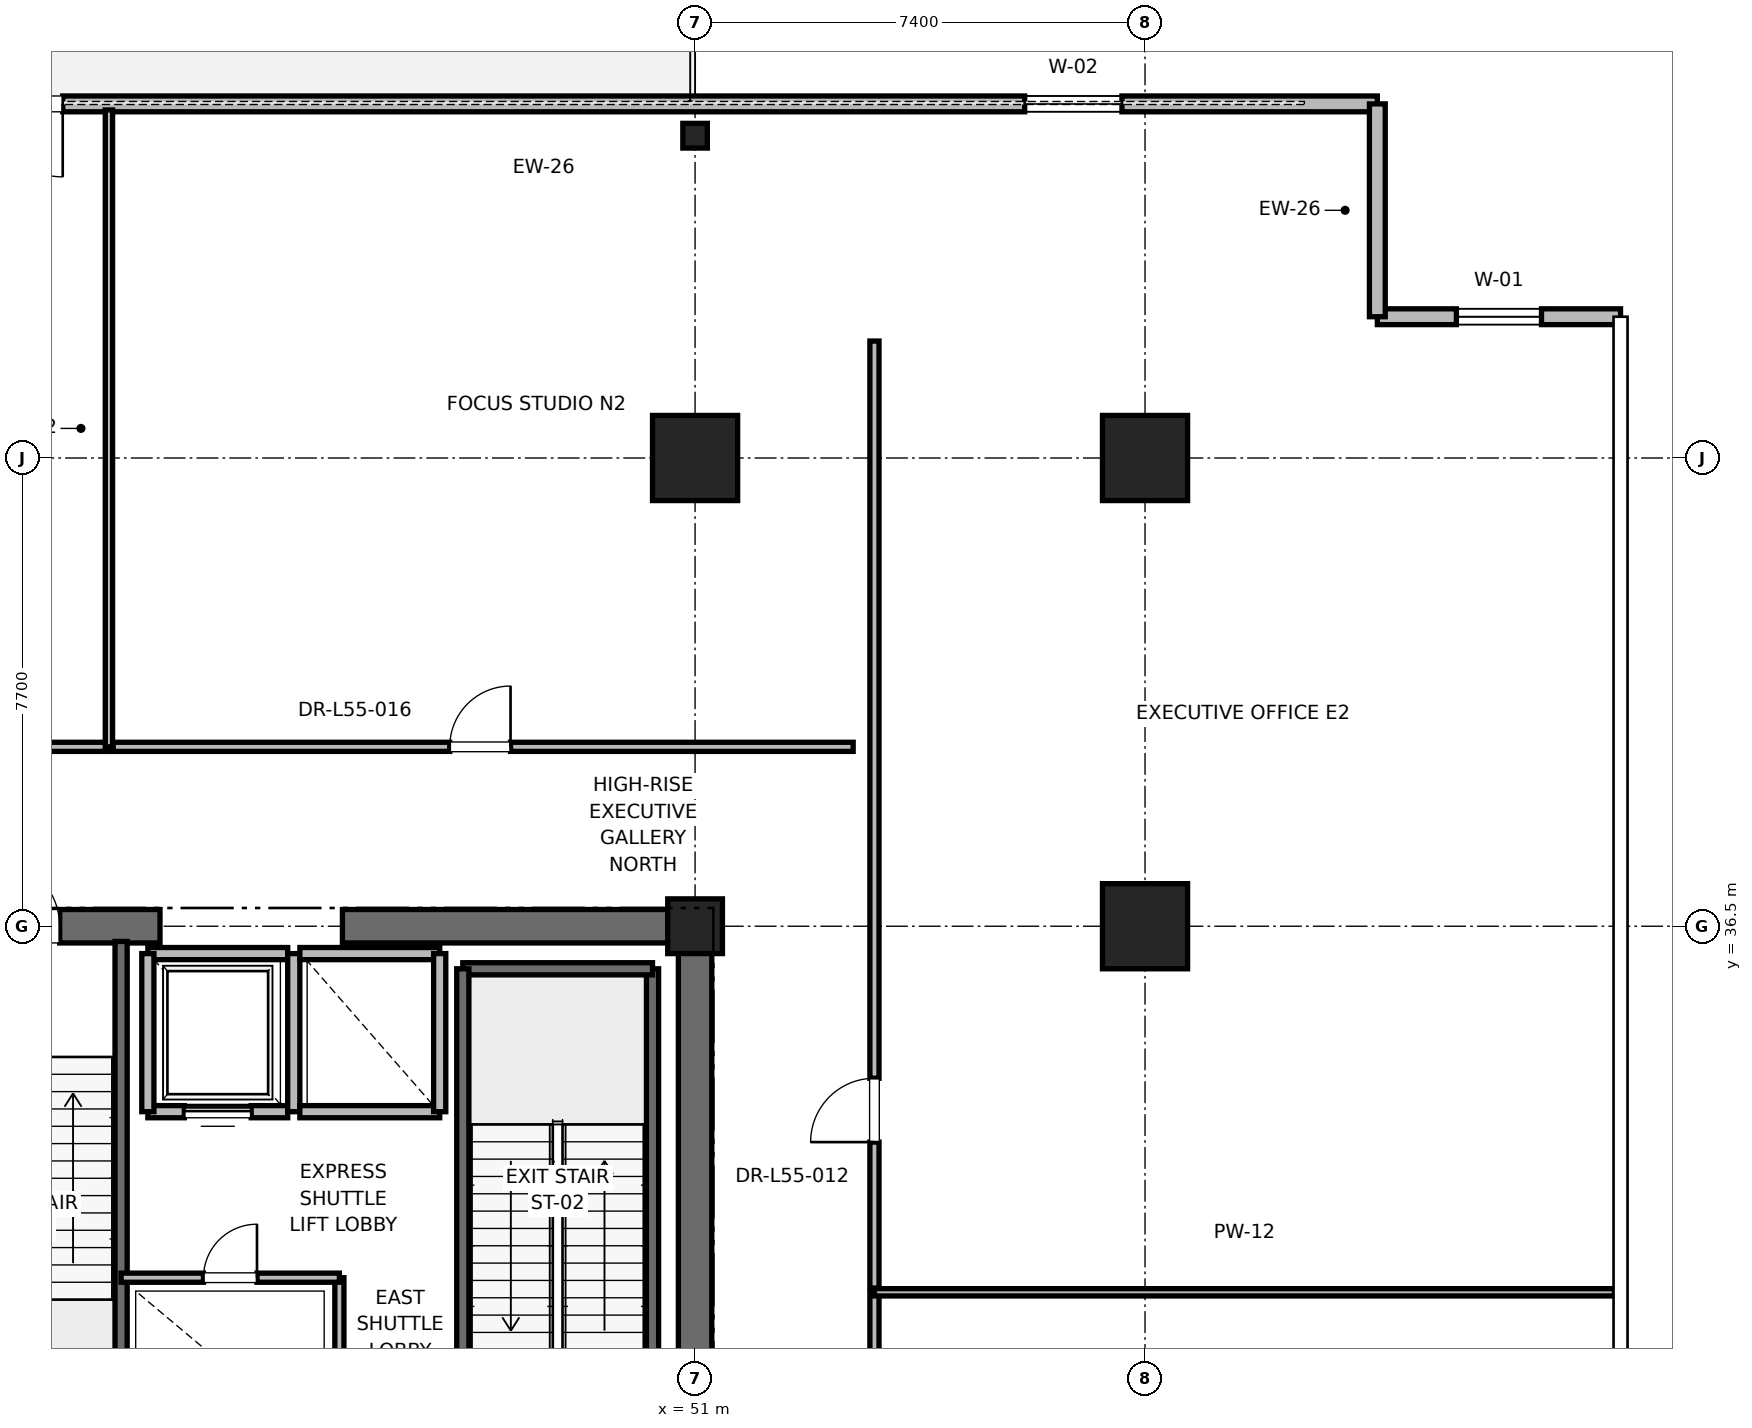
"""IFC4 building model, lengths in metres.
Left out: names, types, materials, properties, quantities, classifications, styles, units other than length and angle.
Written with IfcOpenShell. Run it as: python <this file> out.ifc"""

import sys

from ifc_helpers import new_model, si_unit, direction, frame, frame_2d, origin, origin_2d, place, context, subcontext, project, spatial, rectangle, i_section, extrude, element, fill, save


model = new_model("IFC4")
c1 = context("Model", 3, precision=1e-05, world=origin(), true_north=direction((0.0, 1.0)))
c2 = subcontext(c1, "Body", "Model", "MODEL_VIEW")
j1 = project(units=[si_unit("LENGTHUNIT", "METRE"), si_unit("PLANEANGLEUNIT", "RADIAN")], contexts=[c1])
p1 = place(None, origin())
s1 = spatial("IfcSite", under=j1, at=p1, CompositionType="ELEMENT")
p2 = place(p1, origin())
s2 = spatial("IfcBuilding", under=s1, at=p2, CompositionType="ELEMENT")
p3 = place(p2, frame((0.0, 0.0, 238.2)))
s3 = spatial("IfcBuildingStorey", under=s2, at=p3, CompositionType="ELEMENT", Elevation=238.2)
for number, where, z_axis, x_axis in (
    (1, (51.0, 44.2, 0.0), (0.0, 0.0, 1.0), (1.0, 0.0, 0.0)),
    (2, (58.4, 36.5, 0.0), (0.0, 0.0, 1.0), (1.0, 0.0, 0.0)),
    (3, (58.4, 44.2, 0.0), (0.0, 0.0, 1.0), (1.0, 0.0, 0.0)),
):
    element("IfcColumn", number, at=place(p3, frame(where, z_axis=z_axis, x_axis=x_axis)), inside=s3, PredefinedType="COLUMN", context=c2, shape_type="SweptSolid", body=[
        extrude(rectangle(XDim=1.4, YDim=1.4, at=origin_2d()), origin(), (0.0, 0.0, 1.0), 5.0),
    ])
p4 = place(p3, frame((51.0, 49.5, 0.0), z_axis=(0.0, 0.0, 1.0), x_axis=(1.0, 0.0, 0.0)))
e4 = element("IfcColumn", 4, at=p4, inside=s3, PredefinedType="COLUMN", context=c2, shape_type="SweptSolid", body=[
    extrude(i_section(OverallWidth=0.403, OverallDepth=0.406, WebThickness=0.027, FlangeThickness=0.043, FilletRadius=0.015, at=origin_2d()), origin(), (0.0, 0.0, 1.0), 5.0),
])
p5 = place(p3, frame((51.0, 36.5, 0.0), z_axis=(0.0, 0.0, 1.0), x_axis=(1.0, 0.0, 0.0)))
e5 = element("IfcColumn", 5, at=p5, inside=s3, PredefinedType="PILASTER", context=c2, shape_type="SweptSolid", body=[
    extrude(rectangle(XDim=0.9, YDim=0.9, at=origin_2d()), origin(), (0.0, 0.0, 1.0), 5.0),
])
p6 = place(p3, frame((37.8, 36.5, 0.0), z_axis=(0.0, 0.0, 1.0), x_axis=(1.0, 0.0, 0.0)))
e6 = element("IfcWall", 6, at=p6, inside=s3, PredefinedType="SHEAR", context=c2, shape_type="SweptSolid", body=[
    extrude(rectangle(XDim=4.4, YDim=0.55, at=frame_2d((2.2, 0.0))), origin(), (0.0, 0.0, 1.0), 4.785),
])
p7 = place(p6, frame((1.65, 0.0, 0.0)))
e7 = element("IfcOpeningElement", 7, at=p7, cuts=e6, PredefinedType="OPENING", context=c2, shape_type="SweptSolid", body=[
    extrude(rectangle(XDim=1.1, YDim=2.15, at=frame_2d((0.55, 1.075))), frame((0.0, 0.275, 0.0), z_axis=(0.0, -1.0, 0.0), x_axis=(1.0, 0.0, 0.0)), (0.0, 0.0, 1.0), 0.55),
])
p8 = place(p3, frame((45.2, 36.5, 0.0), z_axis=(0.0, 0.0, 1.0), x_axis=(1.0, 0.0, 0.0)))
e8 = element("IfcWall", 8, at=p8, inside=s3, PredefinedType="SHEAR", context=c2, shape_type="SweptSolid", body=[
    extrude(rectangle(XDim=5.8, YDim=0.55, at=frame_2d((2.9, 0.0))), origin(), (0.0, 0.0, 1.0), 4.785),
])
p9 = place(p3, frame((51.0, 27.7, 0.0), z_axis=(0.0, 0.0, 1.0), x_axis=(0.0, 1.0, 0.0)))
e9 = element("IfcWall", 9, at=p9, inside=s3, PredefinedType="SHEAR", context=c2, shape_type="SweptSolid", body=[
    extrude(rectangle(XDim=8.8, YDim=0.55, at=frame_2d((4.4, 0.0))), origin(), (0.0, 0.0, 1.0), 4.785),
])
p10 = place(p3, frame((62.221, 50.023, 0.0), z_axis=(0.0, 0.0, 1.0), x_axis=(-1.0, 0.0, 0.0)))
e10 = element("IfcWall", 10, at=p10, inside=s3, PredefinedType="PARAPET", context=c2, shape_type="SweptSolid", body=[
    extrude(rectangle(XDim=44.441, YDim=0.26, at=frame_2d((22.221, 0.0))), origin(), (0.0, 0.0, 1.0), 4.047),
])
p11 = place(p10, frame((4.2, 0.0, 0.85)))
e11 = element("IfcOpeningElement", 11, at=p11, cuts=e10, PredefinedType="OPENING", context=c2, shape_type="SweptSolid", body=[
    extrude(rectangle(XDim=1.6, YDim=2.1, at=frame_2d((0.8, 1.05))), frame((0.0, 0.13, 0.0), z_axis=(0.0, -1.0, 0.0), x_axis=(1.0, 0.0, 0.0)), (0.0, 0.0, 1.0), 0.26),
])
p12 = place(p10, frame((21.621, 0.0, 0.0)))
e12 = element("IfcOpeningElement", 12, at=p12, cuts=e10, PredefinedType="OPENING", context=c2, shape_type="SweptSolid", body=[
    extrude(rectangle(XDim=1.2, YDim=2.2, at=frame_2d((0.6, 1.1))), frame((0.0, 0.13, 0.0), z_axis=(0.0, -1.0, 0.0), x_axis=(1.0, 0.0, 0.0)), (0.0, 0.0, 1.0), 0.26),
])
p13 = place(p10, frame((38.641, 0.0, 0.85)))
e13 = element("IfcOpeningElement", 13, at=p13, cuts=e10, PredefinedType="OPENING", context=c2, shape_type="SweptSolid", body=[
    extrude(rectangle(XDim=1.6, YDim=2.1, at=frame_2d((0.8, 1.05))), frame((0.0, 0.13, 0.0), z_axis=(0.0, -1.0, 0.0), x_axis=(1.0, 0.0, 0.0)), (0.0, 0.0, 1.0), 0.26),
])
p14 = place(p3, frame((66.221, 46.523, 0.0), z_axis=(0.0, 0.0, 1.0), x_axis=(-1.0, 0.0, 0.0)))
e14 = element("IfcWall", 14, at=p14, inside=s3, PredefinedType="PARAPET", context=c2, shape_type="SweptSolid", body=[
    extrude(rectangle(XDim=4.0, YDim=0.26, at=frame_2d((2.0, 0.0))), origin(), (0.0, 0.0, 1.0), 4.785),
])
p15 = place(p14, frame((1.3, 0.0, 0.85)))
e15 = element("IfcOpeningElement", 15, at=p15, cuts=e14, PredefinedType="OPENING", context=c2, shape_type="SweptSolid", body=[
    extrude(rectangle(XDim=1.4, YDim=2.0, at=frame_2d((0.7, 1.0))), frame((0.0, 0.13, 0.0), z_axis=(0.0, -1.0, 0.0), x_axis=(1.0, 0.0, 0.0)), (0.0, 0.0, 1.0), 0.26),
])
p16 = place(p3, frame((62.221, 46.523, 0.0), z_axis=(0.0, 0.0, 1.0), x_axis=(0.0, 1.0, 0.0)))
e16 = element("IfcWall", 16, at=p16, inside=s3, PredefinedType="PARAPET", context=c2, shape_type="SweptSolid", body=[
    extrude(rectangle(XDim=3.5, YDim=0.26, at=frame_2d((1.75, 0.0))), origin(), (0.0, 0.0, 1.0), 4.785),
])
p17 = place(p3, frame((50.3, 27.65, 0.0), z_axis=(0.0, 0.0, 1.0), x_axis=(0.0, 1.0, 0.0)))
e17 = element("IfcWall", 17, at=p17, inside=s3, PredefinedType="SOLIDWALL", context=c2, shape_type="SweptSolid", body=[
    extrude(rectangle(XDim=8.15, YDim=0.2, at=frame_2d((4.075, 0.0))), origin(), (0.0, 0.0, 1.0), 4.785),
])
p18 = place(p3, frame((47.18, 35.8, 0.0), z_axis=(0.0, 0.0, 1.0), x_axis=(1.0, 0.0, 0.0)))
e18 = element("IfcWall", 18, at=p18, inside=s3, PredefinedType="SOLIDWALL", context=c2, shape_type="SweptSolid", body=[
    extrude(rectangle(XDim=3.12, YDim=0.2, at=frame_2d((1.56, 0.0))), origin(), (0.0, 0.0, 1.0), 4.785),
])
p19 = place(p3, frame((47.18, 27.62, 0.0), z_axis=(0.0, 0.0, 1.0), x_axis=(0.0, 1.0, 0.0)))
e19 = element("IfcWall", 19, at=p19, inside=s3, PredefinedType="SOLIDWALL", context=c2, shape_type="SweptSolid", body=[
    extrude(rectangle(XDim=8.18, YDim=0.2, at=frame_2d((4.09, 0.0))), origin(), (0.0, 0.0, 1.0), 4.785),
])
p20 = place(p3, frame((41.56, 27.68, 0.0), z_axis=(0.0, 0.0, 1.0), x_axis=(0.0, 1.0, 0.0)))
e20 = element("IfcWall", 20, at=p20, inside=s3, PredefinedType="SOLIDWALL", context=c2, shape_type="SweptSolid", body=[
    extrude(rectangle(XDim=8.57, YDim=0.2, at=frame_2d((4.285, 0.0))), origin(), (0.0, 0.0, 1.0), 4.785),
])
p21 = place(p3, frame((42.0, 33.45, 0.0), z_axis=(0.0, 0.0, 1.0), x_axis=(1.0, 0.0, 0.0)))
e21 = element("IfcWall", 21, at=p21, inside=s3, PredefinedType="SOLIDWALL", context=c2, shape_type="SweptSolid", body=[
    extrude(rectangle(XDim=2.3, YDim=0.2, at=frame_2d((1.15, 0.0))), origin(), (0.0, 0.0, 1.0), 4.785),
])
p22 = place(p21, frame((0.6, 0.0, 0.0)))
e22 = element("IfcOpeningElement", 22, at=p22, cuts=e21, PredefinedType="OPENING", context=c2, shape_type="SweptSolid", body=[
    extrude(rectangle(XDim=1.1, YDim=2.2, at=frame_2d((0.55, 1.1))), frame((0.0, 0.1, 0.0), z_axis=(0.0, -1.0, 0.0), x_axis=(1.0, 0.0, 0.0)), (0.0, 0.0, 1.0), 0.2),
])
p23 = place(p3, frame((44.3, 36.05, 0.0), z_axis=(0.0, 0.0, 1.0), x_axis=(-1.0, 0.0, 0.0)))
e23 = element("IfcWall", 23, at=p23, inside=s3, PredefinedType="SOLIDWALL", context=c2, shape_type="SweptSolid", body=[
    extrude(rectangle(XDim=2.3, YDim=0.2, at=frame_2d((1.15, 0.0))), origin(), (0.0, 0.0, 1.0), 3.765),
])
for number, where, z_axis, x_axis in (
    (24, (42.0, 36.05, 0.0), (0.0, 0.0, 1.0), (0.0, -1.0, 0.0)),
    (25, (44.4, 33.45, 0.0), (0.0, 0.0, 1.0), (0.0, 1.0, 0.0)),
):
    element("IfcWall", number, at=place(p3, frame(where, z_axis=z_axis, x_axis=x_axis)), inside=s3, PredefinedType="SOLIDWALL", context=c2, shape_type="SweptSolid", body=[
        extrude(rectangle(XDim=2.6, YDim=0.2, at=frame_2d((1.3, 0.0))), origin(), (0.0, 0.0, 1.0), 3.765),
    ])
p24 = place(p3, frame((44.5, 33.45, 0.0), z_axis=(0.0, 0.0, 1.0), x_axis=(1.0, 0.0, 0.0)))
e26 = element("IfcWall", 26, at=p24, inside=s3, PredefinedType="SOLIDWALL", context=c2, shape_type="SweptSolid", body=[
    extrude(rectangle(XDim=2.3, YDim=0.2, at=frame_2d((1.15, 0.0))), origin(), (0.0, 0.0, 1.0), 4.785),
])
p25 = place(p3, frame((46.8, 36.05, 0.0), z_axis=(0.0, 0.0, 1.0), x_axis=(-1.0, 0.0, 0.0)))
e27 = element("IfcWall", 27, at=p25, inside=s3, PredefinedType="SOLIDWALL", context=c2, shape_type="SweptSolid", body=[
    extrude(rectangle(XDim=2.3, YDim=0.2, at=frame_2d((1.15, 0.0))), origin(), (0.0, 0.0, 1.0), 3.765),
])
p26 = place(p3, frame((46.8, 33.45, 0.0), z_axis=(0.0, 0.0, 1.0), x_axis=(0.0, 1.0, 0.0)))
e28 = element("IfcWall", 28, at=p26, inside=s3, PredefinedType="SOLIDWALL", context=c2, shape_type="SweptSolid", body=[
    extrude(rectangle(XDim=2.6, YDim=0.2, at=frame_2d((1.3, 0.0))), origin(), (0.0, 0.0, 1.0), 4.785),
])
p27 = place(p3, frame((45.15, 27.62, 0.0), z_axis=(0.0, 0.0, 1.0), x_axis=(0.0, 1.0, 0.0)))
e29 = element("IfcWall", 29, at=p27, inside=s3, PredefinedType="PARTITIONING", context=c2, shape_type="SweptSolid", body=[
    extrude(rectangle(XDim=3.1, YDim=0.15, at=frame_2d((1.55, 0.0))), origin(), (0.0, 0.0, 1.0), 2.85),
])
p28 = place(p3, frame((41.56, 30.72, 0.0), z_axis=(0.0, 0.0, 1.0), x_axis=(1.0, 0.0, 0.0)))
e30 = element("IfcWall", 30, at=p28, inside=s3, PredefinedType="PARTITIONING", context=c2, shape_type="SweptSolid", body=[
    extrude(rectangle(XDim=3.59, YDim=0.15, at=frame_2d((1.795, 0.0))), origin(), (0.0, 0.0, 1.0), 2.85),
])
p29 = place(p28, frame((1.355, 0.0, 0.0)))
e31 = element("IfcOpeningElement", 31, at=p29, cuts=e30, PredefinedType="OPENING", context=c2, shape_type="SweptSolid", body=[
    extrude(rectangle(XDim=0.88, YDim=2.1, at=frame_2d((0.44, 1.05))), frame((0.0, 0.075, 0.0), z_axis=(0.0, -1.0, 0.0), x_axis=(1.0, 0.0, 0.0)), (0.0, 0.0, 1.0), 0.15),
])
p30 = place(p3, frame((26.4, 39.45, 0.0), z_axis=(0.0, 0.0, 1.0), x_axis=(1.0, 0.0, 0.0)))
e32 = element("IfcWall", 32, at=p30, inside=s3, PredefinedType="PARTITIONING", context=c2, shape_type="SweptSolid", body=[
    extrude(rectangle(XDim=14.96, YDim=0.15, at=frame_2d((7.48, 0.0))), origin(), (0.0, 0.0, 1.0), 2.85),
])
p31 = place(p30, frame((6.745, 0.0, 0.0)))
e33 = element("IfcOpeningElement", 33, at=p31, cuts=e32, PredefinedType="OPENING", context=c2, shape_type="SweptSolid", body=[
    extrude(rectangle(XDim=1.5, YDim=2.25, at=frame_2d((0.75, 1.125))), frame((0.0, 0.075, 0.0), z_axis=(0.0, -1.0, 0.0), x_axis=(1.0, 0.0, 0.0)), (0.0, 0.0, 1.0), 0.15),
])
p32 = place(p3, frame((41.36, 39.45, 0.0), z_axis=(0.0, 0.0, 1.0), x_axis=(0.0, 1.0, 0.0)))
e34 = element("IfcWall", 34, at=p32, inside=s3, PredefinedType="PARTITIONING", context=c2, shape_type="SweptSolid", body=[
    extrude(rectangle(XDim=10.473, YDim=0.12, at=frame_2d((5.237, 0.0))), origin(), (0.0, 0.0, 1.0), 2.85),
])
p33 = place(p3, frame((41.43, 39.45, 0.0), z_axis=(0.0, 0.0, 1.0), x_axis=(1.0, 0.0, 0.0)))
e35 = element("IfcWall", 35, at=p33, inside=s3, PredefinedType="PARTITIONING", context=c2, shape_type="SweptSolid", body=[
    extrude(rectangle(XDim=12.17, YDim=0.15, at=frame_2d((6.085, 0.0))), origin(), (0.0, 0.0, 1.0), 2.85),
])
p34 = place(p33, frame((5.535, 0.0, 0.0)))
e36 = element("IfcOpeningElement", 36, at=p34, cuts=e35, PredefinedType="OPENING", context=c2, shape_type="SweptSolid", body=[
    extrude(rectangle(XDim=1.0, YDim=2.15, at=frame_2d((0.5, 1.075))), frame((0.0, 0.075, 0.0), z_axis=(0.0, -1.0, 0.0), x_axis=(1.0, 0.0, 0.0)), (0.0, 0.0, 1.0), 0.15),
])
p35 = place(p3, frame((53.95, 8.877, 0.0), z_axis=(0.0, 0.0, 1.0), x_axis=(0.0, 1.0, 0.0)))
e37 = element("IfcWall", 37, at=p35, inside=s3, PredefinedType="PARTITIONING", context=c2, shape_type="SweptSolid", body=[
    extrude(rectangle(XDim=21.603, YDim=0.15, at=frame_2d((10.802, 0.0))), origin(), (0.0, 0.0, 1.0), 2.85),
])
p36 = place(p35, frame((15.128, 0.0, 0.0)))
e38 = element("IfcOpeningElement", 38, at=p36, cuts=e37, PredefinedType="OPENING", context=c2, shape_type="SweptSolid", body=[
    extrude(rectangle(XDim=1.0, YDim=2.15, at=frame_2d((0.5, 1.075))), frame((0.0, 0.075, 0.0), z_axis=(0.0, -1.0, 0.0), x_axis=(1.0, 0.0, 0.0)), (0.0, 0.0, 1.0), 0.15),
])
p37 = place(p3, frame((53.95, 30.48, 0.0), z_axis=(0.0, 0.0, 1.0), x_axis=(1.0, 0.0, 0.0)))
e39 = element("IfcWall", 39, at=p37, inside=s3, PredefinedType="PARTITIONING", context=c2, shape_type="SweptSolid", body=[
    extrude(rectangle(XDim=12.171, YDim=0.12, at=frame_2d((6.085, 0.0))), origin(), (0.0, 0.0, 1.0), 2.85),
])
p38 = place(p3, frame((53.95, 30.55, 0.0), z_axis=(0.0, 0.0, 1.0), x_axis=(0.0, 1.0, 0.0)))
e40 = element("IfcWall", 40, at=p38, inside=s3, PredefinedType="PARTITIONING", context=c2, shape_type="SweptSolid", body=[
    extrude(rectangle(XDim=15.573, YDim=0.15, at=frame_2d((7.787, 0.0))), origin(), (0.0, 0.0, 1.0), 2.85),
])
p39 = place(p38, frame((2.4, 0.0, 0.0)))
e41 = element("IfcOpeningElement", 41, at=p39, cuts=e40, PredefinedType="OPENING", context=c2, shape_type="SweptSolid", body=[
    extrude(rectangle(XDim=1.05, YDim=2.2, at=frame_2d((0.525, 1.1))), frame((0.0, 0.075, 0.0), z_axis=(0.0, -1.0, 0.0), x_axis=(1.0, 0.0, 0.0)), (0.0, 0.0, 1.0), 0.15),
])
p40 = place(p11, origin())
e42 = element("IfcWindow", 42, at=p40, inside=s3, PartitioningType="SINGLE_PANEL", PredefinedType="WINDOW", context=c2, shape_type="SweptSolid", body=[
    extrude(rectangle(XDim=1.6, YDim=2.1, at=frame_2d((0.8, 1.05))), frame((0.0, 0.03, 0.0), z_axis=(0.0, -1.0, 0.0), x_axis=(1.0, 0.0, 0.0)), (0.0, 0.0, 1.0), 0.06),
])
fill(e11, e42)
p41 = place(p12, origin())
e43 = element("IfcDoor", 43, at=p41, inside=s3, OperationType="SINGLE_SWING_LEFT", PredefinedType="DOOR", context=c2, shape_type="SweptSolid", body=[
    extrude(rectangle(XDim=1.2, YDim=2.2, at=frame_2d((0.6, 1.1))), frame((0.0, 0.025, 0.0), z_axis=(0.0, -1.0, 0.0), x_axis=(1.0, 0.0, 0.0)), (0.0, 0.0, 1.0), 0.05),
])
fill(e12, e43)
p42 = place(p15, origin())
e44 = element("IfcWindow", 44, at=p42, inside=s3, PartitioningType="SINGLE_PANEL", PredefinedType="WINDOW", context=c2, shape_type="SweptSolid", body=[
    extrude(rectangle(XDim=1.4, YDim=2.0, at=frame_2d((0.7, 1.0))), frame((0.0, 0.03, 0.0), z_axis=(0.0, -1.0, 0.0), x_axis=(1.0, 0.0, 0.0)), (0.0, 0.0, 1.0), 0.06),
])
fill(e15, e44)
p43 = place(p7, origin())
e45 = element("IfcDoor", 45, at=p43, inside=s3, OperationType="SINGLE_SWING_LEFT", PredefinedType="DOOR", context=c2, shape_type="SweptSolid", body=[
    extrude(rectangle(XDim=1.1, YDim=2.15, at=frame_2d((0.55, 1.075))), frame((0.0, 0.025, 0.0), z_axis=(0.0, -1.0, 0.0), x_axis=(1.0, 0.0, 0.0)), (0.0, 0.0, 1.0), 0.05),
])
fill(e7, e45)
p44 = place(p22, origin())
e46 = element("IfcDoor", 46, at=p44, inside=s3, OperationType="SLIDING_TO_RIGHT", PredefinedType="DOOR", context=c2, shape_type="SweptSolid", body=[
    extrude(rectangle(XDim=1.1, YDim=2.2, at=frame_2d((0.55, 1.1))), frame((0.0, 0.025, 0.0), z_axis=(0.0, -1.0, 0.0), x_axis=(1.0, 0.0, 0.0)), (0.0, 0.0, 1.0), 0.05),
])
fill(e22, e46)
p45 = place(p29, origin())
e47 = element("IfcDoor", 47, at=p45, inside=s3, OperationType="SINGLE_SWING_RIGHT", PredefinedType="DOOR", context=c2, shape_type="SweptSolid", body=[
    extrude(rectangle(XDim=0.88, YDim=2.1, at=frame_2d((0.44, 1.05))), frame((0.0, 0.025, 0.0), z_axis=(0.0, -1.0, 0.0), x_axis=(1.0, 0.0, 0.0)), (0.0, 0.0, 1.0), 0.05),
])
fill(e31, e47)
p46 = place(p34, origin())
e48 = element("IfcDoor", 48, at=p46, inside=s3, OperationType="SINGLE_SWING_RIGHT", PredefinedType="DOOR", context=c2, shape_type="SweptSolid", body=[
    extrude(rectangle(XDim=1.0, YDim=2.15, at=frame_2d((0.5, 1.075))), frame((0.0, 0.025, 0.0), z_axis=(0.0, -1.0, 0.0), x_axis=(1.0, 0.0, 0.0)), (0.0, 0.0, 1.0), 0.05),
])
fill(e36, e48)
p47 = place(p39, origin())
e49 = element("IfcDoor", 49, at=p47, inside=s3, OperationType="SINGLE_SWING_LEFT", PredefinedType="DOOR", context=c2, shape_type="SweptSolid", body=[
    extrude(rectangle(XDim=1.05, YDim=2.2, at=frame_2d((0.525, 1.1))), frame((0.0, 0.025, 0.0), z_axis=(0.0, -1.0, 0.0), x_axis=(1.0, 0.0, 0.0)), (0.0, 0.0, 1.0), 0.05),
])
fill(e41, e49)
save(model, sys.argv[1])
